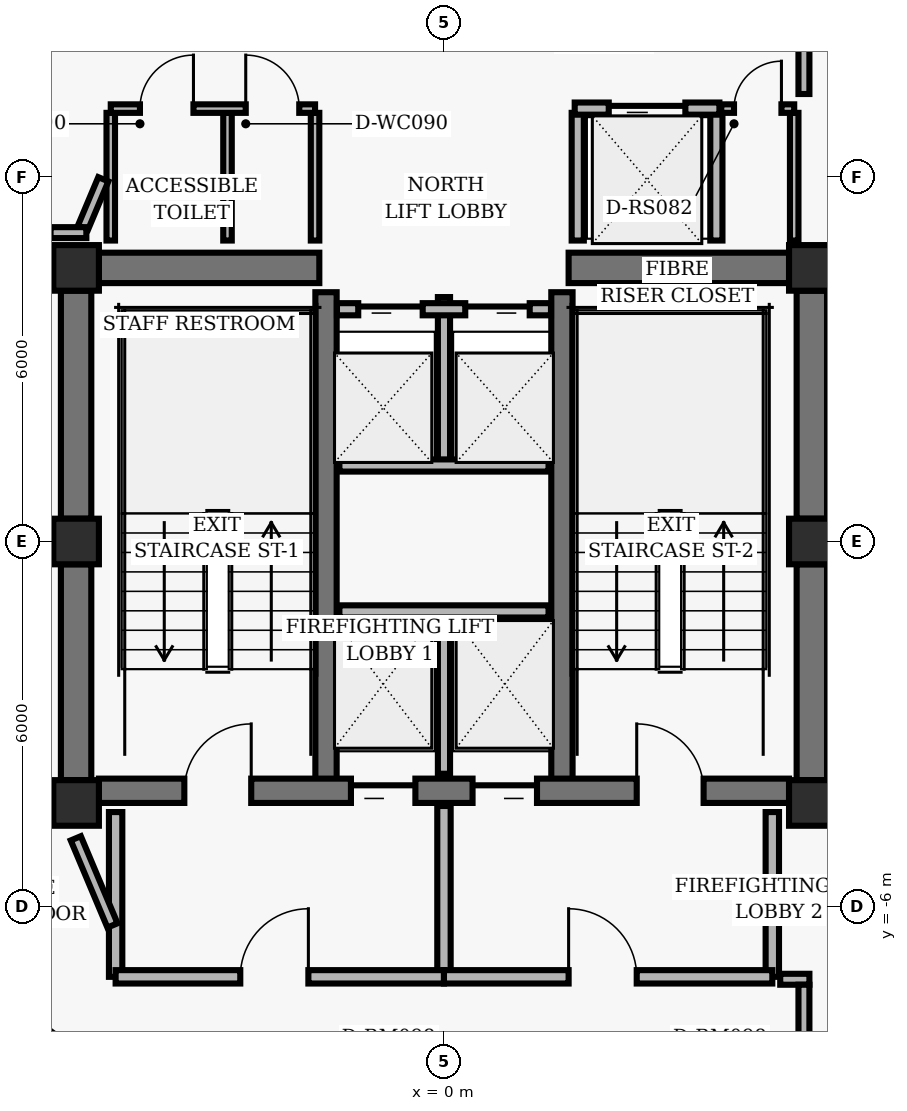
"""IFC4 building model, lengths in metres.
Left out: names, types, materials, properties, quantities, classifications, styles, units other than length and angle.
Written with IfcOpenShell. Run it as: python <this file> out.ifc"""

import sys

from ifc_helpers import new_model, si_unit, direction, frame, frame_2d, origin, origin_2d, place, context, subcontext, project, spatial, rectangle, hollow_rectangle, extrude, element, fill, save


model = new_model("IFC4")
c1 = context("Model", 3, precision=1e-05, world=origin(), true_north=direction((0.0, 1.0)))
c2 = subcontext(c1, "Body", "Model", "MODEL_VIEW")
j1 = project(units=[si_unit("LENGTHUNIT", "METRE"), si_unit("PLANEANGLEUNIT", "RADIAN")], contexts=[c1])
p1 = place(None, origin())
s1 = spatial("IfcSite", under=j1, at=p1, CompositionType="ELEMENT")
p2 = place(p1, origin())
s2 = spatial("IfcBuilding", under=s1, at=p2, CompositionType="ELEMENT")
p3 = place(p2, frame((0.0, 0.0, 224.0)))
s3 = spatial("IfcBuildingStorey", under=s2, at=p3, CompositionType="ELEMENT", Elevation=224.0)
for number, where, z_axis, x_axis in (
    (1, (-6.05, 4.5, 0.0), (0.0, 0.0, 1.0), (1.0, 0.0, 0.0)),
    (2, (6.05, 4.5, 0.0), (0.0, 0.0, 1.0), (1.0, 0.0, 0.0)),
    (3, (-6.05, 0.0, 0.0), (0.0, 0.0, 1.0), (1.0, 0.0, 0.0)),
    (4, (6.05, 0.0, 0.0), (0.0, 0.0, 1.0), (1.0, 0.0, 0.0)),
    (5, (-6.05, -4.3, 0.0), (0.0, 0.0, 1.0), (1.0, 0.0, 0.0)),
    (6, (6.05, -4.3, 0.0), (0.0, 0.0, 1.0), (1.0, 0.0, 0.0)),
):
    element("IfcColumn", number, at=place(p3, frame(where, z_axis=z_axis, x_axis=x_axis)), inside=s3, PredefinedType="COLUMN", context=c2, shape_type="SweptSolid", body=[
        extrude(hollow_rectangle(XDim=0.75, YDim=0.75, WallThickness=0.05, InnerFilletRadius=0.02, OuterFilletRadius=0.04, at=origin_2d()), origin(), (0.0, 0.0, 1.0), 3.04),
    ])
p4 = place(p3, frame((-6.05, 0.375, 0.0), z_axis=(0.0, 0.0, 1.0), x_axis=(0.0, 1.0, 0.0)))
e7 = element("IfcWall", 7, at=p4, inside=s3, PredefinedType="SHEAR", context=c2, shape_type="SweptSolid", body=[
    extrude(rectangle(XDim=3.75, YDim=0.5, at=frame_2d((1.875, 0.0))), origin(), (0.0, 0.0, 1.0), 2.798),
])
p5 = place(p3, frame((-6.05, -3.925, 0.0), z_axis=(0.0, 0.0, 1.0), x_axis=(0.0, 1.0, 0.0)))
e8 = element("IfcWall", 8, at=p5, inside=s3, PredefinedType="SHEAR", context=c2, shape_type="SweptSolid", body=[
    extrude(rectangle(XDim=3.55, YDim=0.5, at=frame_2d((1.775, 0.0))), origin(), (0.0, 0.0, 1.0), 2.798),
])
p6 = place(p3, frame((6.05, 0.375, 0.0), z_axis=(0.0, 0.0, 1.0), x_axis=(0.0, 1.0, 0.0)))
e9 = element("IfcWall", 9, at=p6, inside=s3, PredefinedType="SHEAR", context=c2, shape_type="SweptSolid", body=[
    extrude(rectangle(XDim=3.75, YDim=0.5, at=frame_2d((1.875, 0.0))), origin(), (0.0, 0.0, 1.0), 2.798),
])
p7 = place(p3, frame((6.05, -3.925, 0.0), z_axis=(0.0, 0.0, 1.0), x_axis=(0.0, 1.0, 0.0)))
e10 = element("IfcWall", 10, at=p7, inside=s3, PredefinedType="SHEAR", context=c2, shape_type="SweptSolid", body=[
    extrude(rectangle(XDim=3.55, YDim=0.5, at=frame_2d((1.775, 0.0))), origin(), (0.0, 0.0, 1.0), 2.798),
])
for number, where, z_axis, x_axis in (
    (11, (-1.94, -4.1, 0.0), (0.0, 0.0, 1.0), (0.0, 1.0, 0.0)),
    (12, (1.94, -4.1, 0.0), (0.0, 0.0, 1.0), (0.0, 1.0, 0.0)),
):
    element("IfcWall", number, at=place(p3, frame(where, z_axis=z_axis, x_axis=x_axis)), inside=s3, PredefinedType="SHEAR", context=c2, shape_type="SweptSolid", body=[
        extrude(rectangle(XDim=8.2, YDim=0.35, at=frame_2d((4.1, 0.0))), origin(), (0.0, 0.0, 1.0), 2.798),
    ])
p8 = place(p3, frame((-5.675, -4.1, 0.0), z_axis=(0.0, 0.0, 1.0), x_axis=(1.0, 0.0, 0.0)))
e13 = element("IfcWall", 13, at=p8, inside=s3, PredefinedType="SHEAR", context=c2, shape_type="SweptSolid", body=[
    extrude(rectangle(XDim=11.35, YDim=0.4, at=frame_2d((5.675, 0.0))), origin(), (0.0, 0.0, 1.0), 2.798),
])
p9 = place(p8, frame((1.405, 0.0, 0.0)))
e14 = element("IfcOpeningElement", 14, at=p9, cuts=e13, PredefinedType="OPENING", context=c2, shape_type="SweptSolid", body=[
    extrude(rectangle(XDim=1.1, YDim=2.04, at=frame_2d((0.55, 1.02))), frame((0.0, 0.21, 0.0), z_axis=(0.0, -1.0, 0.0), x_axis=(1.0, 0.0, 0.0)), (0.0, 0.0, 1.0), 0.42),
])
p10 = place(p8, frame((8.845, 0.0, 0.0)))
e15 = element("IfcOpeningElement", 15, at=p10, cuts=e13, PredefinedType="OPENING", context=c2, shape_type="SweptSolid", body=[
    extrude(rectangle(XDim=1.1, YDim=2.04, at=frame_2d((0.55, 1.02))), frame((0.0, 0.21, 0.0), z_axis=(0.0, -1.0, 0.0), x_axis=(1.0, 0.0, 0.0)), (0.0, 0.0, 1.0), 0.42),
])
p11 = place(p8, frame((4.145, 0.0, 0.0)))
e16 = element("IfcOpeningElement", 16, at=p11, cuts=e13, PredefinedType="OPENING", context=c2, shape_type="SweptSolid", body=[
    extrude(rectangle(XDim=1.06, YDim=2.04, at=frame_2d((0.53, 1.02))), frame((0.0, 0.21, 0.0), z_axis=(0.0, -1.0, 0.0), x_axis=(1.0, 0.0, 0.0)), (0.0, 0.0, 1.0), 0.42),
])
p12 = place(p8, frame((6.145, 0.0, 0.0)))
e17 = element("IfcOpeningElement", 17, at=p12, cuts=e13, PredefinedType="OPENING", context=c2, shape_type="SweptSolid", body=[
    extrude(rectangle(XDim=1.06, YDim=2.04, at=frame_2d((0.53, 1.02))), frame((0.0, 0.21, 0.0), z_axis=(0.0, -1.0, 0.0), x_axis=(1.0, 0.0, 0.0)), (0.0, 0.0, 1.0), 0.42),
])
for number, where, z_axis, x_axis in (
    (18, (-5.675, 4.5, 0.0), (0.0, 0.0, 1.0), (1.0, 0.0, 0.0)),
    (19, (2.05, 4.5, 0.0), (0.0, 0.0, 1.0), (1.0, 0.0, 0.0)),
):
    element("IfcWall", number, at=place(p3, frame(where, z_axis=z_axis, x_axis=x_axis)), inside=s3, PredefinedType="SHEAR", context=c2, shape_type="SweptSolid", body=[
        extrude(rectangle(XDim=3.625, YDim=0.5, at=frame_2d((1.812, 0.0))), origin(), (0.0, 0.0, 1.0), 2.798),
    ])
p13 = place(p3, frame((0.0, -3.82, 0.0), z_axis=(0.0, 0.0, 1.0), x_axis=(0.0, 1.0, 0.0)))
e20 = element("IfcWall", 20, at=p13, inside=s3, PredefinedType="PARTITIONING", context=c2, shape_type="SweptSolid", body=[
    extrude(rectangle(XDim=2.67, YDim=0.2, at=frame_2d((1.335, 0.0))), origin(), (0.0, 0.0, 1.0), 2.773),
])
p14 = place(p3, frame((-1.72, -1.15, 0.0), z_axis=(0.0, 0.0, 1.0), x_axis=(1.0, 0.0, 0.0)))
e21 = element("IfcWall", 21, at=p14, inside=s3, PredefinedType="PARTITIONING", context=c2, shape_type="SweptSolid", body=[
    extrude(rectangle(XDim=3.44, YDim=0.2, at=frame_2d((1.72, 0.0))), origin(), (0.0, 0.0, 1.0), 2.773),
])
for number, where, z_axis, x_axis in (
    (22, (-5.4, -7.16, 0.0), (0.0, 0.0, 1.0), (0.0, 1.0, 0.0)),
    (23, (5.4, -7.16, 0.0), (0.0, 0.0, 1.0), (0.0, 1.0, 0.0)),
):
    element("IfcWall", number, at=place(p3, frame(where, z_axis=z_axis, x_axis=x_axis)), inside=s3, PredefinedType="PARTITIONING", context=c2, shape_type="SweptSolid", body=[
        extrude(rectangle(XDim=2.71, YDim=0.22, at=frame_2d((1.355, 0.0))), origin(), (0.0, 0.0, 1.0), 2.773),
    ])
p15 = place(p3, frame((0.0, -7.16, 0.0), z_axis=(0.0, 0.0, 1.0), x_axis=(0.0, 1.0, 0.0)))
e24 = element("IfcWall", 24, at=p15, inside=s3, PredefinedType="PARTITIONING", context=c2, shape_type="SweptSolid", body=[
    extrude(rectangle(XDim=2.81, YDim=0.22, at=frame_2d((1.405, 0.0))), origin(), (0.0, 0.0, 1.0), 2.773),
])
p16 = place(p3, frame((-5.4, -7.16, 0.0), z_axis=(0.0, 0.0, 1.0), x_axis=(1.0, 0.0, 0.0)))
e25 = element("IfcWall", 25, at=p16, inside=s3, PredefinedType="PARTITIONING", context=c2, shape_type="SweptSolid", body=[
    extrude(rectangle(XDim=5.4, YDim=0.22, at=frame_2d((2.7, 0.0))), origin(), (0.0, 0.0, 1.0), 2.395),
])
p17 = place(p16, frame((2.05, 0.0, 0.0)))
e26 = element("IfcOpeningElement", 26, at=p17, cuts=e25, PredefinedType="OPENING", context=c2, shape_type="SweptSolid", body=[
    extrude(rectangle(XDim=1.12, YDim=2.02, at=frame_2d((0.56, 1.01))), frame((0.0, 0.12, 0.0), z_axis=(0.0, -1.0, 0.0), x_axis=(1.0, 0.0, 0.0)), (0.0, 0.0, 1.0), 0.24),
])
p18 = place(p3, frame((0.0, -7.16, 0.0), z_axis=(0.0, 0.0, 1.0), x_axis=(1.0, 0.0, 0.0)))
e27 = element("IfcWall", 27, at=p18, inside=s3, PredefinedType="PARTITIONING", context=c2, shape_type="SweptSolid", body=[
    extrude(rectangle(XDim=5.4, YDim=0.22, at=frame_2d((2.7, 0.0))), origin(), (0.0, 0.0, 1.0), 2.773),
])
p19 = place(p18, frame((2.05, 0.0, 0.0)))
e28 = element("IfcOpeningElement", 28, at=p19, cuts=e27, PredefinedType="OPENING", context=c2, shape_type="SweptSolid", body=[
    extrude(rectangle(XDim=1.12, YDim=2.02, at=frame_2d((0.56, 1.01))), frame((0.0, 0.12, 0.0), z_axis=(0.0, -1.0, 0.0), x_axis=(1.0, 0.0, 0.0)), (0.0, 0.0, 1.0), 0.24),
])
p20 = place(p3, frame((0.0, 1.25, 0.0), z_axis=(0.0, 0.0, 1.0), x_axis=(0.0, 1.0, 0.0)))
e29 = element("IfcWall", 29, at=p20, inside=s3, PredefinedType="PARTITIONING", context=c2, shape_type="SweptSolid", body=[
    extrude(rectangle(XDim=2.77, YDim=0.2, at=frame_2d((1.385, 0.0))), origin(), (0.0, 0.0, 1.0), 2.773),
])
p21 = place(p3, frame((-1.72, 1.25, 0.0), z_axis=(0.0, 0.0, 1.0), x_axis=(1.0, 0.0, 0.0)))
e30 = element("IfcWall", 30, at=p21, inside=s3, PredefinedType="PARTITIONING", context=c2, shape_type="SweptSolid", body=[
    extrude(rectangle(XDim=3.44, YDim=0.2, at=frame_2d((1.72, 0.0))), origin(), (0.0, 0.0, 1.0), 2.773),
])
p22 = place(p3, frame((-1.76, 3.82, 0.0), z_axis=(0.0, 0.0, 1.0), x_axis=(1.0, 0.0, 0.0)))
e31 = element("IfcWall", 31, at=p22, inside=s3, PredefinedType="PARTITIONING", context=c2, shape_type="SweptSolid", body=[
    extrude(rectangle(XDim=3.52, YDim=0.2, at=frame_2d((1.76, 0.0))), origin(), (0.0, 0.0, 1.0), 2.773),
])
p23 = place(p22, frame((0.35, 0.0, 0.0)))
e32 = element("IfcOpeningElement", 32, at=p23, cuts=e31, PredefinedType="OPENING", context=c2, shape_type="SweptSolid", body=[
    extrude(rectangle(XDim=1.06, YDim=2.04, at=frame_2d((0.53, 1.02))), frame((0.0, 0.11, 0.0), z_axis=(0.0, -1.0, 0.0), x_axis=(1.0, 0.0, 0.0)), (0.0, 0.0, 1.0), 0.22),
])
p24 = place(p22, frame((2.11, 0.0, 0.0)))
e33 = element("IfcOpeningElement", 33, at=p24, cuts=e31, PredefinedType="OPENING", context=c2, shape_type="SweptSolid", body=[
    extrude(rectangle(XDim=1.06, YDim=2.04, at=frame_2d((0.53, 1.02))), frame((0.0, 0.11, 0.0), z_axis=(0.0, -1.0, 0.0), x_axis=(1.0, 0.0, 0.0)), (0.0, 0.0, 1.0), 0.22),
])
for number, where, z_axis, x_axis in (
    (34, (2.2, 4.95, 0.0), (0.0, 0.0, 1.0), (0.0, 1.0, 0.0)),
    (35, (4.48, 4.95, 0.0), (0.0, 0.0, 1.0), (0.0, 1.0, 0.0)),
):
    element("IfcWall", number, at=place(p3, frame(where, z_axis=z_axis, x_axis=x_axis)), inside=s3, PredefinedType="PARTITIONING", context=c2, shape_type="SweptSolid", body=[
        extrude(rectangle(XDim=2.1, YDim=0.2, at=frame_2d((1.05, 0.0))), origin(), (0.0, 0.0, 1.0), 2.773),
    ])
p25 = place(p3, frame((2.15, 7.12, 0.0), z_axis=(0.0, 0.0, 1.0), x_axis=(1.0, 0.0, 0.0)))
e36 = element("IfcWall", 36, at=p25, inside=s3, PredefinedType="PARTITIONING", context=c2, shape_type="SweptSolid", body=[
    extrude(rectangle(XDim=2.38, YDim=0.2, at=frame_2d((1.19, 0.0))), origin(), (0.0, 0.0, 1.0), 2.395),
])
p26 = place(p25, frame((0.56, 0.0, 0.0)))
e37 = element("IfcOpeningElement", 37, at=p26, cuts=e36, PredefinedType="OPENING", context=c2, shape_type="SweptSolid", body=[
    extrude(rectangle(XDim=1.26, YDim=2.06, at=frame_2d((0.63, 1.03))), frame((0.0, 0.11, 0.0), z_axis=(0.0, -1.0, 0.0), x_axis=(1.0, 0.0, 0.0)), (0.0, 0.0, 1.0), 0.22),
])
for number, where, z_axis, x_axis in (
    (38, (-5.48, 4.95, 0.0), (0.0, 0.0, 1.0), (0.0, 1.0, 0.0)),
    (39, (-3.56, 4.95, 0.0), (0.0, 0.0, 1.0), (0.0, 1.0, 0.0)),
    (40, (-2.12, 4.95, 0.0), (0.0, 0.0, 1.0), (0.0, 1.0, 0.0)),
):
    element("IfcWall", number, at=place(p3, frame(where, z_axis=z_axis, x_axis=x_axis)), inside=s3, PredefinedType="PARTITIONING", context=c2, shape_type="SweptSolid", body=[
        extrude(rectangle(XDim=2.1, YDim=0.14, at=frame_2d((1.05, 0.0))), origin(), (0.0, 0.0, 1.0), 2.773),
    ])
p27 = place(p3, frame((-5.48, 7.12, 0.0), z_axis=(0.0, 0.0, 1.0), x_axis=(1.0, 0.0, 0.0)))
e41 = element("IfcWall", 41, at=p27, inside=s3, PredefinedType="PARTITIONING", context=c2, shape_type="SweptSolid", body=[
    extrude(rectangle(XDim=3.36, YDim=0.14, at=frame_2d((1.68, 0.0))), origin(), (0.0, 0.0, 1.0), 2.395),
])
p28 = place(p27, frame((0.48, 0.0, 0.0)))
e42 = element("IfcOpeningElement", 42, at=p28, cuts=e41, PredefinedType="OPENING", context=c2, shape_type="SweptSolid", body=[
    extrude(rectangle(XDim=0.88, YDim=2.02, at=frame_2d((0.44, 1.01))), frame((0.0, 0.08, 0.0), z_axis=(0.0, -1.0, 0.0), x_axis=(1.0, 0.0, 0.0)), (0.0, 0.0, 1.0), 0.16),
])
p29 = place(p27, frame((2.22, 0.0, 0.0)))
e43 = element("IfcOpeningElement", 43, at=p29, cuts=e41, PredefinedType="OPENING", context=c2, shape_type="SweptSolid", body=[
    extrude(rectangle(XDim=0.88, YDim=2.02, at=frame_2d((0.44, 1.01))), frame((0.0, 0.08, 0.0), z_axis=(0.0, -1.0, 0.0), x_axis=(1.0, 0.0, 0.0)), (0.0, 0.0, 1.0), 0.16),
])
p30 = place(p3, frame((5.76, 4.95, 0.0), z_axis=(0.0, 0.0, 1.0), x_axis=(0.0, 1.0, 0.0)))
e44 = element("IfcWall", 44, at=p30, inside=s3, PredefinedType="PARTITIONING", context=c2, shape_type="SweptSolid", body=[
    extrude(rectangle(XDim=2.1, YDim=0.14, at=frame_2d((1.05, 0.0))), origin(), (0.0, 0.0, 1.0), 2.773),
])
p31 = place(p3, frame((4.56, 7.12, 0.0), z_axis=(0.0, 0.0, 1.0), x_axis=(1.0, 0.0, 0.0)))
e45 = element("IfcWall", 45, at=p31, inside=s3, PredefinedType="PARTITIONING", context=c2, shape_type="SweptSolid", body=[
    extrude(rectangle(XDim=1.2, YDim=0.14, at=frame_2d((0.6, 0.0))), origin(), (0.0, 0.0, 1.0), 2.773),
])
p32 = place(p31, frame((0.21, 0.0, 0.0)))
e46 = element("IfcOpeningElement", 46, at=p32, cuts=e45, PredefinedType="OPENING", context=c2, shape_type="SweptSolid", body=[
    extrude(rectangle(XDim=0.78, YDim=2.01, at=frame_2d((0.39, 1.005))), frame((0.0, 0.08, 0.0), z_axis=(0.0, -1.0, 0.0), x_axis=(1.0, 0.0, 0.0)), (0.0, 0.0, 1.0), 0.16),
])
p33 = place(p3, frame((5.92, 9.16, 0.0), z_axis=(0.0, 0.0, 1.0), x_axis=(0.0, -1.0, 0.0)))
e47 = element("IfcWall", 47, at=p33, inside=s3, PredefinedType="PARTITIONING", context=c2, shape_type="SweptSolid", body=[
    extrude(rectangle(XDim=1.8, YDim=0.18, at=frame_2d((0.9, 0.0))), origin(), (0.0, 0.0, 1.0), 2.773),
])
p34 = place(p3, frame((-5.602, 5.958, 0.0), z_axis=(0.0, 0.0, 1.0), x_axis=(-0.387588639363, -0.921832439566, 0.0)))
e48 = element("IfcWall", 48, at=p34, inside=s3, PredefinedType="PARTITIONING", context=c2, shape_type="SweptSolid", body=[
    extrude(rectangle(XDim=0.862, YDim=0.18, at=frame_2d((0.431, 0.0))), origin(), (0.0, 0.0, 1.0), 2.773),
])
p35 = place(p3, frame((-5.881, 5.08, 0.0), z_axis=(0.0, 0.0, 1.0), x_axis=(-1.0, 0.0, 0.0)))
e49 = element("IfcWall", 49, at=p35, inside=s3, PredefinedType="PARTITIONING", context=c2, shape_type="SweptSolid", body=[
    extrude(rectangle(XDim=0.589, YDim=0.18, at=frame_2d((0.294, 0.0))), origin(), (0.0, 0.0, 1.0), 2.773),
])
p36 = place(p3, frame((-6.055, -4.882, 0.0), z_axis=(0.0, 0.0, 1.0), x_axis=(0.387579540458, -0.921836265189, 0.0)))
e50 = element("IfcWall", 50, at=p36, inside=s3, PredefinedType="PARTITIONING", context=c2, shape_type="SweptSolid", body=[
    extrude(rectangle(XDim=1.555, YDim=0.18, at=frame_2d((0.777, 0.0))), origin(), (0.0, 0.0, 1.0), 2.253),
])
p37 = place(p3, frame((5.53, -7.2, 0.0), z_axis=(0.0, 0.0, 1.0), x_axis=(1.0, 0.0, 0.0)))
e51 = element("IfcWall", 51, at=p37, inside=s3, PredefinedType="PARTITIONING", context=c2, shape_type="SweptSolid", body=[
    extrude(rectangle(XDim=0.48, YDim=0.18, at=frame_2d((0.24, 0.0))), origin(), (0.0, 0.0, 1.0), 2.773),
])
p38 = place(p3, frame((5.92, -7.29, 0.0), z_axis=(0.0, 0.0, 1.0), x_axis=(0.0, -1.0, 0.0)))
e52 = element("IfcWall", 52, at=p38, inside=s3, PredefinedType="PARTITIONING", context=c2, shape_type="SweptSolid", body=[
    extrude(rectangle(XDim=1.82, YDim=0.18, at=frame_2d((0.91, 0.0))), origin(), (0.0, 0.0, 1.0), 2.253),
])
p39 = place(p9, origin())
e53 = element("IfcDoor", 53, at=p39, inside=s3, OperationType="SINGLE_SWING_RIGHT", PredefinedType="DOOR", context=c2, shape_type="SweptSolid", body=[
    extrude(rectangle(XDim=1.1, YDim=2.04, at=frame_2d((0.55, 1.02))), frame((0.0, 0.025, 0.0), z_axis=(0.0, -1.0, 0.0), x_axis=(1.0, 0.0, 0.0)), (0.0, 0.0, 1.0), 0.05),
])
fill(e14, e53)
p40 = place(p10, origin())
e54 = element("IfcDoor", 54, at=p40, inside=s3, OperationType="SINGLE_SWING_LEFT", PredefinedType="DOOR", context=c2, shape_type="SweptSolid", body=[
    extrude(rectangle(XDim=1.1, YDim=2.04, at=frame_2d((0.55, 1.02))), frame((0.0, 0.025, 0.0), z_axis=(0.0, -1.0, 0.0), x_axis=(1.0, 0.0, 0.0)), (0.0, 0.0, 1.0), 0.05),
])
fill(e15, e54)
p41 = place(p11, origin())
e55 = element("IfcDoor", 55, at=p41, inside=s3, OperationType="SLIDING_TO_LEFT", PredefinedType="DOOR", context=c2, shape_type="SweptSolid", body=[
    extrude(rectangle(XDim=1.06, YDim=2.04, at=frame_2d((0.53, 1.02))), frame((0.0, 0.025, 0.0), z_axis=(0.0, -1.0, 0.0), x_axis=(1.0, 0.0, 0.0)), (0.0, 0.0, 1.0), 0.05),
])
fill(e16, e55)
p42 = place(p12, origin())
e56 = element("IfcDoor", 56, at=p42, inside=s3, OperationType="SLIDING_TO_RIGHT", PredefinedType="DOOR", context=c2, shape_type="SweptSolid", body=[
    extrude(rectangle(XDim=1.06, YDim=2.04, at=frame_2d((0.53, 1.02))), frame((0.0, 0.025, 0.0), z_axis=(0.0, -1.0, 0.0), x_axis=(1.0, 0.0, 0.0)), (0.0, 0.0, 1.0), 0.05),
])
fill(e17, e56)
p43 = place(p17, origin())
e57 = element("IfcDoor", 57, at=p43, inside=s3, OperationType="SINGLE_SWING_RIGHT", PredefinedType="DOOR", context=c2, shape_type="SweptSolid", body=[
    extrude(rectangle(XDim=1.12, YDim=2.02, at=frame_2d((0.56, 1.01))), frame((0.0, 0.025, 0.0), z_axis=(0.0, -1.0, 0.0), x_axis=(1.0, 0.0, 0.0)), (0.0, 0.0, 1.0), 0.05),
])
fill(e26, e57)
p44 = place(p19, origin())
e58 = element("IfcDoor", 58, at=p44, inside=s3, OperationType="SINGLE_SWING_LEFT", PredefinedType="DOOR", context=c2, shape_type="SweptSolid", body=[
    extrude(rectangle(XDim=1.12, YDim=2.02, at=frame_2d((0.56, 1.01))), frame((0.0, 0.025, 0.0), z_axis=(0.0, -1.0, 0.0), x_axis=(1.0, 0.0, 0.0)), (0.0, 0.0, 1.0), 0.05),
])
fill(e28, e58)
p45 = place(p23, origin())
e59 = element("IfcDoor", 59, at=p45, inside=s3, OperationType="SLIDING_TO_LEFT", PredefinedType="DOOR", context=c2, shape_type="SweptSolid", body=[
    extrude(rectangle(XDim=1.06, YDim=2.04, at=frame_2d((0.53, 1.02))), frame((0.0, 0.025, 0.0), z_axis=(0.0, -1.0, 0.0), x_axis=(1.0, 0.0, 0.0)), (0.0, 0.0, 1.0), 0.05),
])
fill(e32, e59)
p46 = place(p24, origin())
e60 = element("IfcDoor", 60, at=p46, inside=s3, OperationType="SLIDING_TO_RIGHT", PredefinedType="DOOR", context=c2, shape_type="SweptSolid", body=[
    extrude(rectangle(XDim=1.06, YDim=2.04, at=frame_2d((0.53, 1.02))), frame((0.0, 0.025, 0.0), z_axis=(0.0, -1.0, 0.0), x_axis=(1.0, 0.0, 0.0)), (0.0, 0.0, 1.0), 0.05),
])
fill(e33, e60)
p47 = place(p26, origin())
e61 = element("IfcDoor", 61, at=p47, inside=s3, OperationType="SLIDING_TO_LEFT", PredefinedType="DOOR", context=c2, shape_type="SweptSolid", body=[
    extrude(rectangle(XDim=1.26, YDim=2.06, at=frame_2d((0.63, 1.03))), frame((0.0, 0.025, 0.0), z_axis=(0.0, -1.0, 0.0), x_axis=(1.0, 0.0, 0.0)), (0.0, 0.0, 1.0), 0.05),
])
fill(e37, e61)
p48 = place(p28, origin())
e62 = element("IfcDoor", 62, at=p48, inside=s3, OperationType="SINGLE_SWING_RIGHT", PredefinedType="DOOR", context=c2, shape_type="SweptSolid", body=[
    extrude(rectangle(XDim=0.88, YDim=2.02, at=frame_2d((0.44, 1.01))), frame((0.0, 0.025, 0.0), z_axis=(0.0, -1.0, 0.0), x_axis=(1.0, 0.0, 0.0)), (0.0, 0.0, 1.0), 0.05),
])
fill(e42, e62)
p49 = place(p29, origin())
e63 = element("IfcDoor", 63, at=p49, inside=s3, OperationType="SINGLE_SWING_LEFT", PredefinedType="DOOR", context=c2, shape_type="SweptSolid", body=[
    extrude(rectangle(XDim=0.88, YDim=2.02, at=frame_2d((0.44, 1.01))), frame((0.0, 0.025, 0.0), z_axis=(0.0, -1.0, 0.0), x_axis=(1.0, 0.0, 0.0)), (0.0, 0.0, 1.0), 0.05),
])
fill(e43, e63)
p50 = place(p32, origin())
e64 = element("IfcDoor", 64, at=p50, inside=s3, OperationType="SINGLE_SWING_RIGHT", PredefinedType="DOOR", context=c2, shape_type="SweptSolid", body=[
    extrude(rectangle(XDim=0.78, YDim=2.01, at=frame_2d((0.39, 1.005))), frame((0.0, 0.025, 0.0), z_axis=(0.0, -1.0, 0.0), x_axis=(1.0, 0.0, 0.0)), (0.0, 0.0, 1.0), 0.05),
])
fill(e46, e64)
save(model, sys.argv[1])
